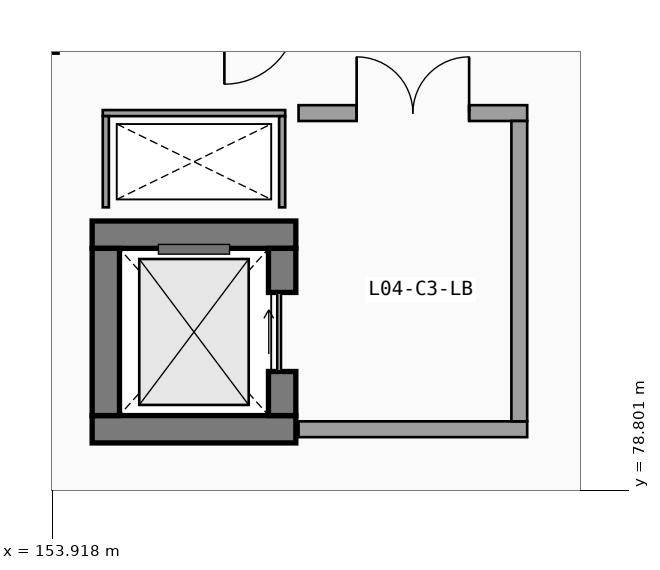
"""IFC4 building model, lengths in metres.
Left out: names, types, materials, properties, quantities, classifications, styles, units other than length and angle.
Written with IfcOpenShell. Run it as: python <this file> out.ifc"""

import sys

from ifc_helpers import new_model, si_unit, direction, frame, frame_2d, origin, origin_2d, place, context, subcontext, project, spatial, rectangle, extrude, element, fill, save


model = new_model("IFC4")
c1 = context("Model", 3, precision=1e-05, world=origin(), true_north=direction((0.0, 1.0)))
c2 = subcontext(c1, "Body", "Model", "MODEL_VIEW")
j1 = project(units=[si_unit("LENGTHUNIT", "METRE"), si_unit("PLANEANGLEUNIT", "RADIAN")], contexts=[c1])
p1 = place(None, origin())
s1 = spatial("IfcSite", under=j1, at=p1, CompositionType="ELEMENT")
p2 = place(p1, origin())
s2 = spatial("IfcBuilding", under=s1, at=p2, CompositionType="ELEMENT")
p3 = place(p2, frame((0.0, 0.0, 18.6)))
s3 = spatial("IfcBuildingStorey", under=s2, at=p3, CompositionType="ELEMENT", Elevation=18.6)
p4 = place(p3, frame((153.6, 86.4, 0.0), z_axis=(0.0, 0.0, 1.0), x_axis=(1.0, 0.0, 0.0)))
e1 = element("IfcColumn", 1, at=p4, inside=s3, PredefinedType="COLUMN", context=c2, shape_type="SweptSolid", body=[
    extrude(rectangle(XDim=0.8, YDim=0.8, at=origin_2d()), origin(), (0.0, 0.0, 1.0), 4.5),
])
for number, where, z_axis, x_axis in (
    (2, (154.575, 79.8, 0.0), (0.0, 0.0, 1.0), (1.0, 0.0, 0.0)),
    (3, (157.925, 83.0, 0.0), (0.0, 0.0, 1.0), (-1.0, 0.0, 0.0)),
):
    element("IfcWall", number, at=place(p3, frame(where, z_axis=z_axis, x_axis=x_axis)), inside=s3, PredefinedType="SHEAR", context=c2, shape_type="SweptSolid", body=[
        extrude(rectangle(XDim=3.35, YDim=0.45, at=frame_2d((1.675, 0.0))), origin(), (0.0, 0.0, 1.0), 4.24),
    ])
p5 = place(p3, frame((154.8, 82.775, 0.0), z_axis=(0.0, 0.0, 1.0), x_axis=(0.0, -1.0, 0.0)))
e4 = element("IfcWall", 4, at=p5, inside=s3, PredefinedType="SHEAR", context=c2, shape_type="SweptSolid", body=[
    extrude(rectangle(XDim=2.75, YDim=0.45, at=frame_2d((1.375, 0.0))), origin(), (0.0, 0.0, 1.0), 4.24),
])
p6 = place(p3, frame((157.7, 80.025, 0.0), z_axis=(0.0, 0.0, 1.0), x_axis=(0.0, 1.0, 0.0)))
e5 = element("IfcWall", 5, at=p6, inside=s3, PredefinedType="SHEAR", context=c2, shape_type="SweptSolid", body=[
    extrude(rectangle(XDim=2.75, YDim=0.45, at=frame_2d((1.375, 0.0))), origin(), (0.0, 0.0, 1.0), 4.24),
])
p7 = place(p6, frame((0.725, 0.0, 0.0), z_axis=(0.0, 0.0, 1.0), x_axis=(1.0, 0.0, 0.0)))
e6 = element("IfcOpeningElement", 6, at=p7, cuts=e5, PredefinedType="OPENING", context=c2, shape_type="SweptSolid", body=[
    extrude(rectangle(XDim=1.3, YDim=2.25, at=frame_2d((0.65, 1.125))), frame((0.0, 0.235, 0.0), z_axis=(0.0, -1.0, 0.0), x_axis=(1.0, 0.0, 0.0)), (0.0, 0.0, 1.0), 0.47),
])
p8 = place(p3, frame((157.75, 85.0, 0.0), z_axis=(0.0, 0.0, 1.0), x_axis=(-1.0, 0.0, 0.0)))
e7 = element("IfcWall", 7, at=p8, inside=s3, PredefinedType="PARTITIONING", context=c2, shape_type="SweptSolid", body=[
    extrude(rectangle(XDim=3.0, YDim=0.1, at=frame_2d((1.5, 0.0))), origin(), (0.0, 0.0, 1.0), 4.24),
])
for number, where, z_axis, x_axis in (
    (8, (154.8, 84.95, 0.0), (0.0, 0.0, 1.0), (0.0, -1.0, 0.0)),
    (9, (157.7, 83.45, 0.0), (0.0, 0.0, 1.0), (0.0, 1.0, 0.0)),
):
    element("IfcWall", number, at=place(p3, frame(where, z_axis=z_axis, x_axis=x_axis)), inside=s3, PredefinedType="PARTITIONING", context=c2, shape_type="SweptSolid", body=[
        extrude(rectangle(XDim=1.5, YDim=0.1, at=frame_2d((0.75, 0.0))), origin(), (0.0, 0.0, 1.0), 4.24),
    ])
p9 = place(p3, frame((157.97, 79.8, 0.0), z_axis=(0.0, 0.0, 1.0), x_axis=(1.0, 0.0, 0.0)))
e10 = element("IfcWall", 10, at=p9, inside=s3, PredefinedType="SOLIDWALL", context=c2, shape_type="SweptSolid", body=[
    extrude(rectangle(XDim=3.76, YDim=0.26, at=frame_2d((1.88, 0.0))), origin(), (0.0, 0.0, 1.0), 4.24),
])
p10 = place(p3, frame((161.73, 85.0, 0.0), z_axis=(0.0, 0.0, 1.0), x_axis=(-1.0, 0.0, 0.0)))
e11 = element("IfcWall", 11, at=p10, inside=s3, PredefinedType="SOLIDWALL", context=c2, shape_type="SweptSolid", body=[
    extrude(rectangle(XDim=3.76, YDim=0.26, at=frame_2d((1.88, 0.0))), origin(), (0.0, 0.0, 1.0), 4.24),
])
p11 = place(p10, frame((2.805, 0.0, 0.0), z_axis=(0.0, 0.0, 1.0), x_axis=(-1.0, 0.0, 0.0)))
e12 = element("IfcOpeningElement", 12, at=p11, cuts=e11, PredefinedType="OPENING", context=c2, shape_type="SweptSolid", body=[
    extrude(rectangle(XDim=1.85, YDim=2.25, at=frame_2d((0.925, 1.125))), frame((0.0, 0.14, 0.0), z_axis=(0.0, -1.0, 0.0), x_axis=(1.0, 0.0, 0.0)), (0.0, 0.0, 1.0), 0.28),
])
p12 = place(p3, frame((161.6, 79.93, 0.0), z_axis=(0.0, 0.0, 1.0), x_axis=(0.0, 1.0, 0.0)))
e13 = element("IfcWall", 13, at=p12, inside=s3, PredefinedType="SOLIDWALL", context=c2, shape_type="SweptSolid", body=[
    extrude(rectangle(XDim=4.94, YDim=0.26, at=frame_2d((2.47, 0.0))), origin(), (0.0, 0.0, 1.0), 4.24),
])
p13 = place(p7, origin())
e14 = element("IfcDoor", 14, at=p13, inside=s3, OperationType="SLIDING_TO_RIGHT", PredefinedType="DOOR", context=c2, shape_type="SweptSolid", body=[
    extrude(rectangle(XDim=1.3, YDim=2.25, at=frame_2d((0.65, 1.125))), frame((0.0, 0.025, 0.0), z_axis=(0.0, -1.0, 0.0), x_axis=(1.0, 0.0, 0.0)), (0.0, 0.0, 1.0), 0.05),
])
fill(e6, e14)
p14 = place(p11, origin())
e15 = element("IfcDoor", 15, at=p14, inside=s3, OperationType="DOUBLE_DOOR_SINGLE_SWING", PredefinedType="DOOR", context=c2, shape_type="SweptSolid", body=[
    extrude(rectangle(XDim=1.85, YDim=2.25, at=frame_2d((0.925, 1.125))), frame((0.0, 0.025, 0.0), z_axis=(0.0, -1.0, 0.0), x_axis=(1.0, 0.0, 0.0)), (0.0, 0.0, 1.0), 0.05),
])
fill(e12, e15)
save(model, sys.argv[1])
